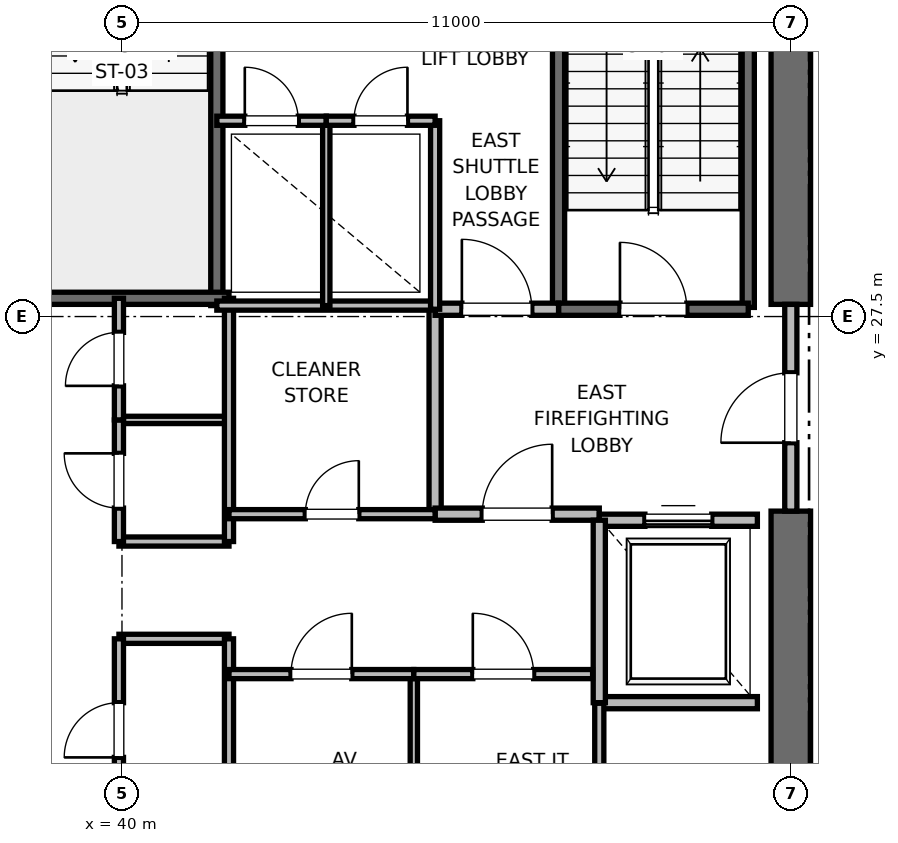
"""IFC4 building model, lengths in metres.
Left out: names, types, materials, properties, quantities, classifications, styles, units other than length and angle.
Written with IfcOpenShell. Run it as: python <this file> out.ifc"""

import sys

from ifc_helpers import new_model, si_unit, direction, frame, frame_2d, origin, place, context, subcontext, project, spatial, rectangle, extrude, element, fill, save


model = new_model("IFC4")
c1 = context("Model", 3, precision=1e-05, world=origin(), true_north=direction((0.0, 1.0)))
c2 = subcontext(c1, "Body", "Model", "MODEL_VIEW")
j1 = project(units=[si_unit("LENGTHUNIT", "METRE"), si_unit("PLANEANGLEUNIT", "RADIAN")], contexts=[c1])
p1 = place(None, origin())
s1 = spatial("IfcSite", under=j1, at=p1, CompositionType="ELEMENT")
p2 = place(p1, origin())
s2 = spatial("IfcBuilding", under=s1, at=p2, CompositionType="ELEMENT")
p3 = place(p2, frame((0.0, 0.0, 35.6)))
s3 = spatial("IfcBuildingStorey", under=s2, at=p3, CompositionType="ELEMENT", Elevation=35.6)
p4 = place(p3, frame((51.0, 18.5, 0.0), z_axis=(0.0, 0.0, 1.0), x_axis=(0.0, 1.0, 0.0)))
e1 = element("IfcWall", 1, at=p4, inside=s3, PredefinedType="SHEAR", context=c2, shape_type="SweptSolid", body=[
    extrude(rectangle(XDim=5.8, YDim=0.65, at=frame_2d((2.9, 0.0))), origin(), (0.0, 0.0, 1.0), 3.76),
])
p5 = place(p3, frame((51.0, 27.7, 0.0), z_axis=(0.0, 0.0, 1.0), x_axis=(0.0, 1.0, 0.0)))
e2 = element("IfcWall", 2, at=p5, inside=s3, PredefinedType="SHEAR", context=c2, shape_type="SweptSolid", body=[
    extrude(rectangle(XDim=8.8, YDim=0.65, at=frame_2d((4.4, 0.0))), origin(), (0.0, 0.0, 1.0), 3.76),
])
p6 = place(p3, frame((50.3, 27.65, 0.0), z_axis=(0.0, 0.0, 1.0), x_axis=(0.0, 1.0, 0.0)))
e3 = element("IfcWall", 3, at=p6, inside=s3, PredefinedType="SOLIDWALL", context=c2, shape_type="SweptSolid", body=[
    extrude(rectangle(XDim=8.15, YDim=0.2, at=frame_2d((4.075, 0.0))), origin(), (0.0, 0.0, 1.0), 3.76),
])
p7 = place(p3, frame((47.18, 27.62, 0.0), z_axis=(0.0, 0.0, 1.0), x_axis=(0.0, 1.0, 0.0)))
e4 = element("IfcWall", 4, at=p7, inside=s3, PredefinedType="SOLIDWALL", context=c2, shape_type="SweptSolid", body=[
    extrude(rectangle(XDim=8.18, YDim=0.2, at=frame_2d((4.09, 0.0))), origin(), (0.0, 0.0, 1.0), 3.76),
])
p8 = place(p3, frame((47.18, 27.62, 0.0), z_axis=(0.0, 0.0, 1.0), x_axis=(1.0, 0.0, 0.0)))
e5 = element("IfcWall", 5, at=p8, inside=s3, PredefinedType="SOLIDWALL", context=c2, shape_type="SweptSolid", body=[
    extrude(rectangle(XDim=3.12, YDim=0.2, at=frame_2d((1.56, 0.0))), origin(), (0.0, 0.0, 1.0), 3.76),
])
p9 = place(p8, frame((1.01, 0.0, 0.0)))
e6 = element("IfcOpeningElement", 6, at=p9, cuts=e5, PredefinedType="OPENING", context=c2, shape_type="SweptSolid", body=[
    extrude(rectangle(XDim=1.1, YDim=2.15, at=frame_2d((0.55, 1.075))), frame((0.0, 0.1, 0.0), z_axis=(0.0, -1.0, 0.0), x_axis=(1.0, 0.0, 0.0)), (0.0, 0.0, 1.0), 0.2),
])
p10 = place(p3, frame((41.56, 27.68, 0.0), z_axis=(0.0, 0.0, 1.0), x_axis=(0.0, 1.0, 0.0)))
e7 = element("IfcWall", 7, at=p10, inside=s3, PredefinedType="SOLIDWALL", context=c2, shape_type="SweptSolid", body=[
    extrude(rectangle(XDim=8.57, YDim=0.2, at=frame_2d((4.285, 0.0))), origin(), (0.0, 0.0, 1.0), 3.76),
])
p11 = place(p3, frame((38.44, 27.8, 0.0), z_axis=(0.0, 0.0, 1.0), x_axis=(1.0, 0.0, 0.0)))
e8 = element("IfcWall", 8, at=p11, inside=s3, PredefinedType="SOLIDWALL", context=c2, shape_type="SweptSolid", body=[
    extrude(rectangle(XDim=3.32, YDim=0.2, at=frame_2d((1.66, 0.0))), origin(), (0.0, 0.0, 1.0), 3.76),
])
p12 = place(p3, frame((45.15, 24.25, 0.0), z_axis=(0.0, 0.0, 1.0), x_axis=(0.0, 1.0, 0.0)))
e9 = element("IfcWall", 9, at=p12, inside=s3, PredefinedType="PARTITIONING", context=c2, shape_type="SweptSolid", body=[
    extrude(rectangle(XDim=3.37, YDim=0.2, at=frame_2d((1.685, 0.0))), origin(), (0.0, 0.0, 1.0), 3.76),
])
p13 = place(p3, frame((45.15, 24.25, 0.0), z_axis=(0.0, 0.0, 1.0), x_axis=(1.0, 0.0, 0.0)))
e10 = element("IfcWall", 10, at=p13, inside=s3, PredefinedType="PARTITIONING", context=c2, shape_type="SweptSolid", body=[
    extrude(rectangle(XDim=2.7, YDim=0.2, at=frame_2d((1.35, 0.0))), origin(), (0.0, 0.0, 1.0), 3.76),
])
p14 = place(p13, frame((0.775, 0.0, 0.0)))
e11 = element("IfcOpeningElement", 11, at=p14, cuts=e10, PredefinedType="OPENING", context=c2, shape_type="SweptSolid", body=[
    extrude(rectangle(XDim=1.15, YDim=2.2, at=frame_2d((0.575, 1.1))), frame((0.0, 0.1, 0.0), z_axis=(0.0, -1.0, 0.0), x_axis=(1.0, 0.0, 0.0)), (0.0, 0.0, 1.0), 0.2),
])
p15 = place(p3, frame((45.15, 27.62, 0.0), z_axis=(0.0, 0.0, 1.0), x_axis=(1.0, 0.0, 0.0)))
e12 = element("IfcWall", 12, at=p15, inside=s3, PredefinedType="PARTITIONING", context=c2, shape_type="SweptSolid", body=[
    extrude(rectangle(XDim=2.03, YDim=0.2, at=frame_2d((1.015, 0.0))), origin(), (0.0, 0.0, 1.0), 3.76),
])
p16 = place(p15, frame((0.44, 0.0, 0.0)))
e13 = element("IfcOpeningElement", 13, at=p16, cuts=e12, PredefinedType="OPENING", context=c2, shape_type="SweptSolid", body=[
    extrude(rectangle(XDim=1.15, YDim=2.2, at=frame_2d((0.575, 1.1))), frame((0.0, 0.1, 0.0), z_axis=(0.0, -1.0, 0.0), x_axis=(1.0, 0.0, 0.0)), (0.0, 0.0, 1.0), 0.2),
])
p17 = place(p3, frame((51.0, 24.3, 0.0), z_axis=(0.0, 0.0, 1.0), x_axis=(0.0, 1.0, 0.0)))
e14 = element("IfcWall", 14, at=p17, inside=s3, PredefinedType="PARTITIONING", context=c2, shape_type="SweptSolid", body=[
    extrude(rectangle(XDim=3.4, YDim=0.2, at=frame_2d((1.7, 0.0))), origin(), (0.0, 0.0, 1.0), 2.54),
])
p18 = place(p17, frame((1.125, 0.0, 0.0)))
e15 = element("IfcOpeningElement", 15, at=p18, cuts=e14, PredefinedType="OPENING", context=c2, shape_type="SweptSolid", body=[
    extrude(rectangle(XDim=1.15, YDim=2.2, at=frame_2d((0.575, 1.1))), frame((0.0, 0.1, 0.0), z_axis=(0.0, -1.0, 0.0), x_axis=(1.0, 0.0, 0.0)), (0.0, 0.0, 1.0), 0.2),
])
p19 = place(p3, frame((47.85, 21.15, 0.0), z_axis=(0.0, 0.0, 1.0), x_axis=(1.0, 0.0, 0.0)))
e16 = element("IfcWall", 16, at=p19, inside=s3, PredefinedType="SOLIDWALL", context=c2, shape_type="SweptSolid", body=[
    extrude(rectangle(XDim=2.6, YDim=0.2, at=frame_2d((1.3, 0.0))), origin(), (0.0, 0.0, 1.0), 3.76),
])
p20 = place(p3, frame((50.45, 24.15, 0.0), z_axis=(0.0, 0.0, 1.0), x_axis=(-1.0, 0.0, 0.0)))
e17 = element("IfcWall", 17, at=p20, inside=s3, PredefinedType="SOLIDWALL", context=c2, shape_type="SweptSolid", body=[
    extrude(rectangle(XDim=2.6, YDim=0.2, at=frame_2d((1.3, 0.0))), origin(), (0.0, 0.0, 1.0), 2.54),
])
p21 = place(p20, frame((0.75, 0.0, 0.0)))
e18 = element("IfcOpeningElement", 18, at=p21, cuts=e17, PredefinedType="OPENING", context=c2, shape_type="SweptSolid", body=[
    extrude(rectangle(XDim=1.1, YDim=2.2, at=frame_2d((0.55, 1.1))), frame((0.0, 0.1, 0.0), z_axis=(0.0, -1.0, 0.0), x_axis=(1.0, 0.0, 0.0)), (0.0, 0.0, 1.0), 0.2),
])
p22 = place(p3, frame((47.85, 24.15, 0.0), z_axis=(0.0, 0.0, 1.0), x_axis=(0.0, -1.0, 0.0)))
e19 = element("IfcWall", 19, at=p22, inside=s3, PredefinedType="SOLIDWALL", context=c2, shape_type="SweptSolid", body=[
    extrude(rectangle(XDim=3.0, YDim=0.2, at=frame_2d((1.5, 0.0))), origin(), (0.0, 0.0, 1.0), 3.76),
])
for number, where, z_axis, x_axis in (
    (20, (39.95, 22.2, 0.0), (0.0, 0.0, 1.0), (1.0, 0.0, 0.0)),
    (21, (39.95, 23.8, 0.0), (0.0, 0.0, 1.0), (1.0, 0.0, 0.0)),
):
    element("IfcWall", number, at=place(p3, frame(where, z_axis=z_axis, x_axis=x_axis)), inside=s3, PredefinedType="PARTITIONING", context=c2, shape_type="SweptSolid", body=[
        extrude(rectangle(XDim=1.81, YDim=0.15, at=frame_2d((0.905, 0.0))), origin(), (0.0, 0.0, 1.0), 2.85),
    ])
p23 = place(p3, frame((39.95, 25.8, 0.0), z_axis=(0.0, 0.0, 1.0), x_axis=(1.0, 0.0, 0.0)))
e22 = element("IfcWall", 22, at=p23, inside=s3, PredefinedType="PARTITIONING", context=c2, shape_type="SweptSolid", body=[
    extrude(rectangle(XDim=1.81, YDim=0.12, at=frame_2d((0.905, 0.0))), origin(), (0.0, 0.0, 1.0), 2.85),
])
p24 = place(p3, frame((41.76, 18.6, 0.0), z_axis=(0.0, 0.0, 1.0), x_axis=(0.0, 1.0, 0.0)))
e23 = element("IfcWall", 23, at=p24, inside=s3, PredefinedType="PARTITIONING", context=c2, shape_type="SweptSolid", body=[
    extrude(rectangle(XDim=3.6, YDim=0.15, at=frame_2d((1.8, 0.0))), origin(), (0.0, 0.0, 1.0), 2.54),
])
p25 = place(p3, frame((41.76, 23.8, 0.0), z_axis=(0.0, 0.0, 1.0), x_axis=(0.0, 1.0, 0.0)))
e24 = element("IfcWall", 24, at=p25, inside=s3, PredefinedType="PARTITIONING", context=c2, shape_type="SweptSolid", body=[
    extrude(rectangle(XDim=4.0, YDim=0.15, at=frame_2d((2.0, 0.0))), origin(), (0.0, 0.0, 1.0), 2.85),
])
p26 = place(p3, frame((39.95, 19.2, 0.0), z_axis=(0.0, 0.0, 1.0), x_axis=(0.0, 1.0, 0.0)))
e25 = element("IfcWall", 25, at=p26, inside=s3, PredefinedType="PARTITIONING", context=c2, shape_type="SweptSolid", body=[
    extrude(rectangle(XDim=3.0, YDim=0.15, at=frame_2d((1.5, 0.0))), origin(), (0.0, 0.0, 1.0), 2.85),
])
p27 = place(p26, frame((1.05, 0.0, 0.0)))
e26 = element("IfcOpeningElement", 26, at=p27, cuts=e25, PredefinedType="OPENING", context=c2, shape_type="SweptSolid", body=[
    extrude(rectangle(XDim=0.9, YDim=2.1, at=frame_2d((0.45, 1.05))), frame((0.0, 0.075, 0.0), z_axis=(0.0, -1.0, 0.0), x_axis=(1.0, 0.0, 0.0)), (0.0, 0.0, 1.0), 0.15),
])
p28 = place(p3, frame((39.95, 23.8, 0.0), z_axis=(0.0, 0.0, 1.0), x_axis=(0.0, 1.0, 0.0)))
e27 = element("IfcWall", 27, at=p28, inside=s3, PredefinedType="PARTITIONING", context=c2, shape_type="SweptSolid", body=[
    extrude(rectangle(XDim=2.0, YDim=0.15, at=frame_2d((1.0, 0.0))), origin(), (0.0, 0.0, 1.0), 2.85),
])
p29 = place(p28, frame((0.55, 0.0, 0.0)))
e28 = element("IfcOpeningElement", 28, at=p29, cuts=e27, PredefinedType="OPENING", context=c2, shape_type="SweptSolid", body=[
    extrude(rectangle(XDim=0.9, YDim=2.1, at=frame_2d((0.45, 1.05))), frame((0.0, 0.075, 0.0), z_axis=(0.0, -1.0, 0.0), x_axis=(1.0, 0.0, 0.0)), (0.0, 0.0, 1.0), 0.15),
])
p30 = place(p3, frame((39.95, 25.8, 0.0), z_axis=(0.0, 0.0, 1.0), x_axis=(0.0, 1.0, 0.0)))
e29 = element("IfcWall", 29, at=p30, inside=s3, PredefinedType="PARTITIONING", context=c2, shape_type="SweptSolid", body=[
    extrude(rectangle(XDim=2.0, YDim=0.15, at=frame_2d((1.0, 0.0))), origin(), (0.0, 0.0, 1.0), 2.85),
])
p31 = place(p30, frame((0.56, 0.0, 0.0)))
e30 = element("IfcOpeningElement", 30, at=p31, cuts=e29, PredefinedType="OPENING", context=c2, shape_type="SweptSolid", body=[
    extrude(rectangle(XDim=0.88, YDim=2.1, at=frame_2d((0.44, 1.05))), frame((0.0, 0.075, 0.0), z_axis=(0.0, -1.0, 0.0), x_axis=(1.0, 0.0, 0.0)), (0.0, 0.0, 1.0), 0.15),
])
p32 = place(p3, frame((41.56, 27.68, 0.0), z_axis=(0.0, 0.0, 1.0), x_axis=(1.0, 0.0, 0.0)))
e31 = element("IfcWall", 31, at=p32, inside=s3, PredefinedType="PARTITIONING", context=c2, shape_type="SweptSolid", body=[
    extrude(rectangle(XDim=3.59, YDim=0.15, at=frame_2d((1.795, 0.0))), origin(), (0.0, 0.0, 1.0), 2.85),
])
p33 = place(p3, frame((47.85, 18.6, 0.0), z_axis=(0.0, 0.0, 1.0), x_axis=(0.0, 1.0, 0.0)))
e32 = element("IfcWall", 32, at=p33, inside=s3, PredefinedType="PARTITIONING", context=c2, shape_type="SweptSolid", body=[
    extrude(rectangle(XDim=2.54, YDim=0.15, at=frame_2d((1.27, 0.0))), origin(), (0.0, 0.0, 1.0), 2.85),
])
p34 = place(p3, frame((44.8, 18.6, 0.0), z_axis=(0.0, 0.0, 1.0), x_axis=(0.0, 1.0, 0.0)))
e33 = element("IfcWall", 33, at=p34, inside=s3, PredefinedType="PARTITIONING", context=c2, shape_type="SweptSolid", body=[
    extrude(rectangle(XDim=3.02, YDim=0.12, at=frame_2d((1.51, 0.0))), origin(), (0.0, 0.0, 1.0), 2.85),
])
p35 = place(p3, frame((41.76, 21.62, 0.0), z_axis=(0.0, 0.0, 1.0), x_axis=(1.0, 0.0, 0.0)))
e34 = element("IfcWall", 34, at=p35, inside=s3, PredefinedType="PARTITIONING", context=c2, shape_type="SweptSolid", body=[
    extrude(rectangle(XDim=3.04, YDim=0.15, at=frame_2d((1.52, 0.0))), origin(), (0.0, 0.0, 1.0), 2.85),
])
p36 = place(p35, frame((1.02, 0.0, 0.0)))
e35 = element("IfcOpeningElement", 35, at=p36, cuts=e34, PredefinedType="OPENING", context=c2, shape_type="SweptSolid", body=[
    extrude(rectangle(XDim=1.0, YDim=2.15, at=frame_2d((0.5, 1.075))), frame((0.0, 0.075, 0.0), z_axis=(0.0, -1.0, 0.0), x_axis=(1.0, 0.0, 0.0)), (0.0, 0.0, 1.0), 0.15),
])
p37 = place(p3, frame((44.8, 21.62, 0.0), z_axis=(0.0, 0.0, 1.0), x_axis=(1.0, 0.0, 0.0)))
e36 = element("IfcWall", 36, at=p37, inside=s3, PredefinedType="PARTITIONING", context=c2, shape_type="SweptSolid", body=[
    extrude(rectangle(XDim=2.94, YDim=0.15, at=frame_2d((1.47, 0.0))), origin(), (0.0, 0.0, 1.0), 2.85),
])
p38 = place(p37, frame((0.97, 0.0, 0.0)))
e37 = element("IfcOpeningElement", 37, at=p38, cuts=e36, PredefinedType="OPENING", context=c2, shape_type="SweptSolid", body=[
    extrude(rectangle(XDim=1.0, YDim=2.15, at=frame_2d((0.5, 1.075))), frame((0.0, 0.075, 0.0), z_axis=(0.0, -1.0, 0.0), x_axis=(1.0, 0.0, 0.0)), (0.0, 0.0, 1.0), 0.15),
])
p39 = place(p3, frame((41.76, 24.25, 0.0), z_axis=(0.0, 0.0, 1.0), x_axis=(1.0, 0.0, 0.0)))
e38 = element("IfcWall", 38, at=p39, inside=s3, PredefinedType="PARTITIONING", context=c2, shape_type="SweptSolid", body=[
    extrude(rectangle(XDim=3.39, YDim=0.15, at=frame_2d((1.695, 0.0))), origin(), (0.0, 0.0, 1.0), 2.85),
])
p40 = place(p39, frame((1.255, 0.0, 0.0)))
e39 = element("IfcOpeningElement", 39, at=p40, cuts=e38, PredefinedType="OPENING", context=c2, shape_type="SweptSolid", body=[
    extrude(rectangle(XDim=0.88, YDim=2.1, at=frame_2d((0.44, 1.05))), frame((0.0, 0.075, 0.0), z_axis=(0.0, -1.0, 0.0), x_axis=(1.0, 0.0, 0.0)), (0.0, 0.0, 1.0), 0.15),
])
p41 = place(p3, frame((45.15, 27.62, 0.0), z_axis=(0.0, 0.0, 1.0), x_axis=(0.0, 1.0, 0.0)))
e40 = element("IfcWall", 40, at=p41, inside=s3, PredefinedType="PARTITIONING", context=c2, shape_type="SweptSolid", body=[
    extrude(rectangle(XDim=3.1, YDim=0.15, at=frame_2d((1.55, 0.0))), origin(), (0.0, 0.0, 1.0), 2.85),
])
p42 = place(p3, frame((43.36, 27.68, 0.0), z_axis=(0.0, 0.0, 1.0), x_axis=(0.0, 1.0, 0.0)))
e41 = element("IfcWall", 41, at=p42, inside=s3, PredefinedType="PARTITIONING", context=c2, shape_type="SweptSolid", body=[
    extrude(rectangle(XDim=3.04, YDim=0.12, at=frame_2d((1.52, 0.0))), origin(), (0.0, 0.0, 1.0), 2.85),
])
p43 = place(p3, frame((41.56, 30.72, 0.0), z_axis=(0.0, 0.0, 1.0), x_axis=(1.0, 0.0, 0.0)))
e42 = element("IfcWall", 42, at=p43, inside=s3, PredefinedType="PARTITIONING", context=c2, shape_type="SweptSolid", body=[
    extrude(rectangle(XDim=1.8, YDim=0.15, at=frame_2d((0.9, 0.0))), origin(), (0.0, 0.0, 1.0), 2.85),
])
p44 = place(p43, frame((0.46, 0.0, 0.0)))
e43 = element("IfcOpeningElement", 43, at=p44, cuts=e42, PredefinedType="OPENING", context=c2, shape_type="SweptSolid", body=[
    extrude(rectangle(XDim=0.88, YDim=2.1, at=frame_2d((0.44, 1.05))), frame((0.0, 0.075, 0.0), z_axis=(0.0, -1.0, 0.0), x_axis=(1.0, 0.0, 0.0)), (0.0, 0.0, 1.0), 0.15),
])
p45 = place(p3, frame((43.36, 30.72, 0.0), z_axis=(0.0, 0.0, 1.0), x_axis=(1.0, 0.0, 0.0)))
e44 = element("IfcWall", 44, at=p45, inside=s3, PredefinedType="PARTITIONING", context=c2, shape_type="SweptSolid", body=[
    extrude(rectangle(XDim=1.79, YDim=0.15, at=frame_2d((0.895, 0.0))), origin(), (0.0, 0.0, 1.0), 2.85),
])
p46 = place(p45, frame((0.455, 0.0, 0.0)))
e45 = element("IfcOpeningElement", 45, at=p46, cuts=e44, PredefinedType="OPENING", context=c2, shape_type="SweptSolid", body=[
    extrude(rectangle(XDim=0.88, YDim=2.1, at=frame_2d((0.44, 1.05))), frame((0.0, 0.075, 0.0), z_axis=(0.0, -1.0, 0.0), x_axis=(1.0, 0.0, 0.0)), (0.0, 0.0, 1.0), 0.15),
])
p47 = place(p9, origin())
e46 = element("IfcDoor", 46, at=p47, inside=s3, OperationType="SINGLE_SWING_LEFT", PredefinedType="DOOR", context=c2, shape_type="SweptSolid", body=[
    extrude(rectangle(XDim=1.1, YDim=2.15, at=frame_2d((0.55, 1.075))), frame((0.0, 0.025, 0.0), z_axis=(0.0, -1.0, 0.0), x_axis=(1.0, 0.0, 0.0)), (0.0, 0.0, 1.0), 0.05),
])
fill(e6, e46)
p48 = place(p14, origin())
e47 = element("IfcDoor", 47, at=p48, inside=s3, OperationType="SINGLE_SWING_RIGHT", PredefinedType="DOOR", context=c2, shape_type="SweptSolid", body=[
    extrude(rectangle(XDim=1.15, YDim=2.2, at=frame_2d((0.575, 1.1))), frame((0.0, 0.025, 0.0), z_axis=(0.0, -1.0, 0.0), x_axis=(1.0, 0.0, 0.0)), (0.0, 0.0, 1.0), 0.05),
])
fill(e11, e47)
p49 = place(p16, origin())
e48 = element("IfcDoor", 48, at=p49, inside=s3, OperationType="SINGLE_SWING_LEFT", PredefinedType="DOOR", context=c2, shape_type="SweptSolid", body=[
    extrude(rectangle(XDim=1.15, YDim=2.2, at=frame_2d((0.575, 1.1))), frame((0.0, 0.025, 0.0), z_axis=(0.0, -1.0, 0.0), x_axis=(1.0, 0.0, 0.0)), (0.0, 0.0, 1.0), 0.05),
])
fill(e13, e48)
p50 = place(p18, origin())
e49 = element("IfcDoor", 49, at=p50, inside=s3, OperationType="SINGLE_SWING_LEFT", PredefinedType="DOOR", context=c2, shape_type="SweptSolid", body=[
    extrude(rectangle(XDim=1.15, YDim=2.2, at=frame_2d((0.575, 1.1))), frame((0.0, 0.025, 0.0), z_axis=(0.0, -1.0, 0.0), x_axis=(1.0, 0.0, 0.0)), (0.0, 0.0, 1.0), 0.05),
])
fill(e15, e49)
p51 = place(p21, origin())
e50 = element("IfcDoor", 50, at=p51, inside=s3, OperationType="SLIDING_TO_RIGHT", PredefinedType="DOOR", context=c2, shape_type="SweptSolid", body=[
    extrude(rectangle(XDim=1.1, YDim=2.2, at=frame_2d((0.55, 1.1))), frame((0.0, 0.025, 0.0), z_axis=(0.0, -1.0, 0.0), x_axis=(1.0, 0.0, 0.0)), (0.0, 0.0, 1.0), 0.05),
])
fill(e18, e50)
p52 = place(p27, origin())
e51 = element("IfcDoor", 51, at=p52, inside=s3, OperationType="SINGLE_SWING_LEFT", PredefinedType="DOOR", context=c2, shape_type="SweptSolid", body=[
    extrude(rectangle(XDim=0.9, YDim=2.1, at=frame_2d((0.45, 1.05))), frame((0.0, 0.025, 0.0), z_axis=(0.0, -1.0, 0.0), x_axis=(1.0, 0.0, 0.0)), (0.0, 0.0, 1.0), 0.05),
])
fill(e26, e51)
p53 = place(p29, origin())
e52 = element("IfcDoor", 52, at=p53, inside=s3, OperationType="SINGLE_SWING_RIGHT", PredefinedType="DOOR", context=c2, shape_type="SweptSolid", body=[
    extrude(rectangle(XDim=0.9, YDim=2.1, at=frame_2d((0.45, 1.05))), frame((0.0, 0.025, 0.0), z_axis=(0.0, -1.0, 0.0), x_axis=(1.0, 0.0, 0.0)), (0.0, 0.0, 1.0), 0.05),
])
fill(e28, e52)
p54 = place(p31, origin())
e53 = element("IfcDoor", 53, at=p54, inside=s3, OperationType="SINGLE_SWING_LEFT", PredefinedType="DOOR", context=c2, shape_type="SweptSolid", body=[
    extrude(rectangle(XDim=0.88, YDim=2.1, at=frame_2d((0.44, 1.05))), frame((0.0, 0.025, 0.0), z_axis=(0.0, -1.0, 0.0), x_axis=(1.0, 0.0, 0.0)), (0.0, 0.0, 1.0), 0.05),
])
fill(e30, e53)
p55 = place(p36, origin())
e54 = element("IfcDoor", 54, at=p55, inside=s3, OperationType="SINGLE_SWING_RIGHT", PredefinedType="DOOR", context=c2, shape_type="SweptSolid", body=[
    extrude(rectangle(XDim=1.0, YDim=2.15, at=frame_2d((0.5, 1.075))), frame((0.0, 0.025, 0.0), z_axis=(0.0, -1.0, 0.0), x_axis=(1.0, 0.0, 0.0)), (0.0, 0.0, 1.0), 0.05),
])
fill(e35, e54)
p56 = place(p38, origin())
e55 = element("IfcDoor", 55, at=p56, inside=s3, OperationType="SINGLE_SWING_LEFT", PredefinedType="DOOR", context=c2, shape_type="SweptSolid", body=[
    extrude(rectangle(XDim=1.0, YDim=2.15, at=frame_2d((0.5, 1.075))), frame((0.0, 0.025, 0.0), z_axis=(0.0, -1.0, 0.0), x_axis=(1.0, 0.0, 0.0)), (0.0, 0.0, 1.0), 0.05),
])
fill(e37, e55)
p57 = place(p40, origin())
e56 = element("IfcDoor", 56, at=p57, inside=s3, OperationType="SINGLE_SWING_RIGHT", PredefinedType="DOOR", context=c2, shape_type="SweptSolid", body=[
    extrude(rectangle(XDim=0.88, YDim=2.1, at=frame_2d((0.44, 1.05))), frame((0.0, 0.025, 0.0), z_axis=(0.0, -1.0, 0.0), x_axis=(1.0, 0.0, 0.0)), (0.0, 0.0, 1.0), 0.05),
])
fill(e39, e56)
p58 = place(p44, origin())
e57 = element("IfcDoor", 57, at=p58, inside=s3, OperationType="SINGLE_SWING_LEFT", PredefinedType="DOOR", context=c2, shape_type="SweptSolid", body=[
    extrude(rectangle(XDim=0.88, YDim=2.1, at=frame_2d((0.44, 1.05))), frame((0.0, 0.025, 0.0), z_axis=(0.0, -1.0, 0.0), x_axis=(1.0, 0.0, 0.0)), (0.0, 0.0, 1.0), 0.05),
])
fill(e43, e57)
p59 = place(p46, origin())
e58 = element("IfcDoor", 58, at=p59, inside=s3, OperationType="SINGLE_SWING_RIGHT", PredefinedType="DOOR", context=c2, shape_type="SweptSolid", body=[
    extrude(rectangle(XDim=0.88, YDim=2.1, at=frame_2d((0.44, 1.05))), frame((0.0, 0.025, 0.0), z_axis=(0.0, -1.0, 0.0), x_axis=(1.0, 0.0, 0.0)), (0.0, 0.0, 1.0), 0.05),
])
fill(e45, e58)
save(model, sys.argv[1])
